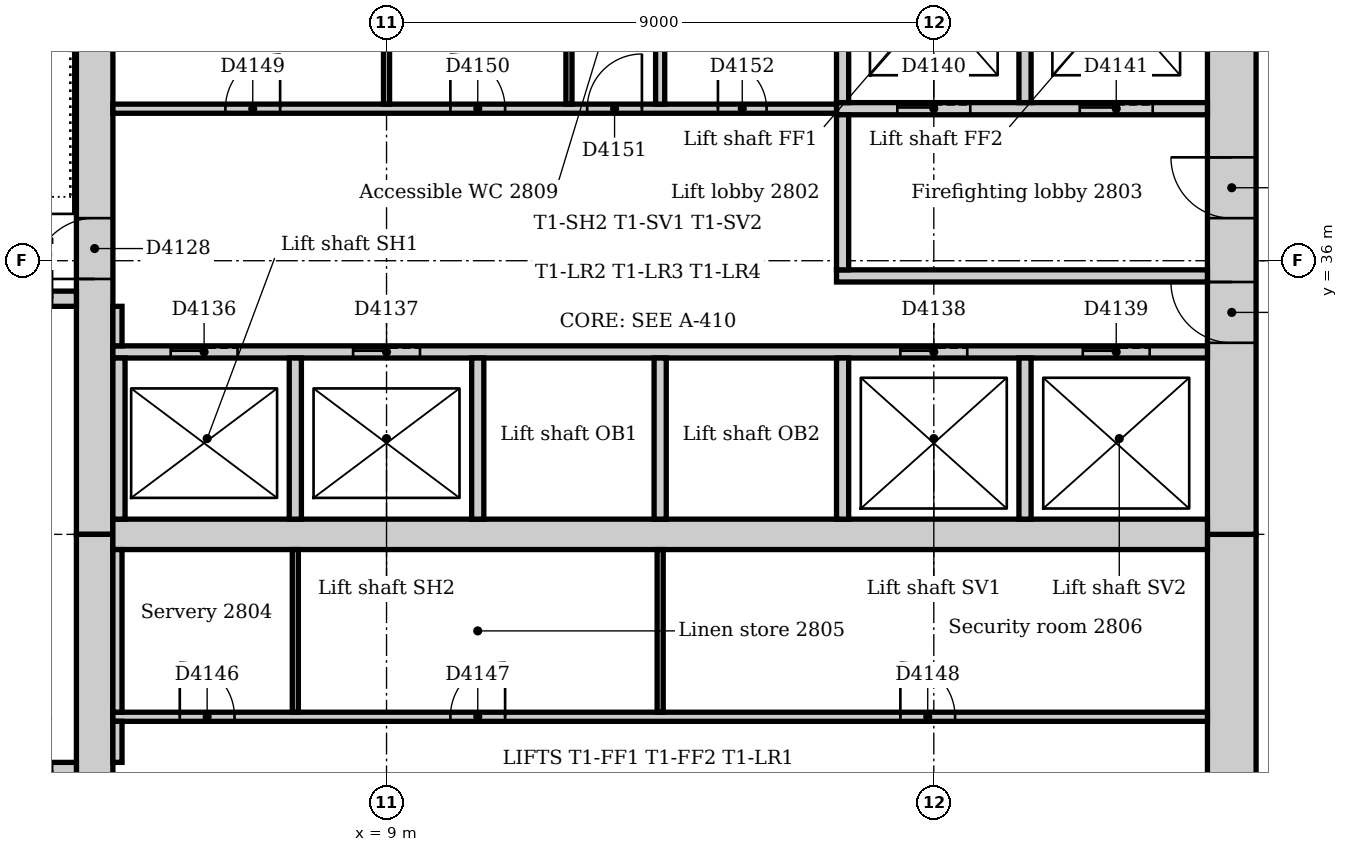
"""IFC4 building model, lengths in metres.
Left out: names, types, materials, properties, quantities, classifications, styles, units other than length and angle.
Written with IfcOpenShell. Run it as: python <this file> out.ifc"""

import sys

from ifc_helpers import new_model, si_unit, direction, frame, frame_2d, origin, place, context, subcontext, project, spatial, rectangle, extrude, element, fill, save


model = new_model("IFC4")
c1 = context("Model", 3, precision=1e-05, world=origin(), true_north=direction((0.0, 1.0)))
c2 = subcontext(c1, "Body", "Model", "MODEL_VIEW")
j1 = project(units=[si_unit("LENGTHUNIT", "METRE"), si_unit("PLANEANGLEUNIT", "RADIAN")], contexts=[c1])
p1 = place(None, origin())
s1 = spatial("IfcSite", under=j1, at=p1, CompositionType="ELEMENT")
p2 = place(p1, origin())
s2 = spatial("IfcBuilding", under=s1, at=p2, CompositionType="ELEMENT")
p3 = place(p2, frame((0.0, 0.0, 120.0)))
s3 = spatial("IfcBuildingStorey", under=s2, at=p3, CompositionType="ELEMENT", Elevation=120.0)
p4 = place(p3, frame((22.9, 21.0, 0.0), z_axis=(0.0, 0.0, 1.0), x_axis=(0.0, 1.0, 0.0)))
e1 = element("IfcWall", 1, at=p4, inside=s3, PredefinedType="SOLIDWALL", context=c2, shape_type="SweptSolid", body=[
    extrude(rectangle(XDim=10.5, YDim=0.8, at=frame_2d((5.25, 0.0))), origin(), (0.0, 0.0, 1.0), 4.0),
])
p5 = place(p4, frame((4.35, 0.0, 0.0)))
e2 = element("IfcOpeningElement", 2, at=p5, cuts=e1, PredefinedType="OPENING", context=c2, shape_type="SweptSolid", body=[
    extrude(rectangle(XDim=1.8, YDim=2.1, at=frame_2d((0.9, 1.05))), frame((0.0, 0.41, 0.0), z_axis=(0.0, -1.0, 0.0), x_axis=(1.0, 0.0, 0.0)), (0.0, 0.0, 1.0), 0.82),
])
p6 = place(p3, frame((22.9, 31.5, 0.0), z_axis=(0.0, 0.0, 1.0), x_axis=(0.0, 1.0, 0.0)))
e3 = element("IfcWall", 3, at=p6, inside=s3, PredefinedType="SOLIDWALL", context=c2, shape_type="SweptSolid", body=[
    extrude(rectangle(XDim=10.5, YDim=0.8, at=frame_2d((5.25, 0.0))), origin(), (0.0, 0.0, 1.0), 4.0),
])
p7 = place(p6, frame((3.15, 0.0, 0.0)))
e4 = element("IfcOpeningElement", 4, at=p7, cuts=e3, PredefinedType="OPENING", context=c2, shape_type="SweptSolid", body=[
    extrude(rectangle(XDim=1.0, YDim=2.1, at=frame_2d((0.5, 1.05))), frame((0.0, 0.41, 0.0), z_axis=(0.0, -1.0, 0.0), x_axis=(1.0, 0.0, 0.0)), (0.0, 0.0, 1.0), 0.82),
])
p8 = place(p6, frame((5.2, 0.0, 0.0)))
e5 = element("IfcOpeningElement", 5, at=p8, cuts=e3, PredefinedType="OPENING", context=c2, shape_type="SweptSolid", body=[
    extrude(rectangle(XDim=1.0, YDim=2.1, at=frame_2d((0.5, 1.05))), frame((0.0, 0.41, 0.0), z_axis=(0.0, -1.0, 0.0), x_axis=(1.0, 0.0, 0.0)), (0.0, 0.0, 1.0), 0.82),
])
p9 = place(p3, frame((4.2, 42.0, 0.0), z_axis=(0.0, 0.0, 1.0), x_axis=(0.0, -1.0, 0.0)))
e6 = element("IfcWall", 6, at=p9, inside=s3, PredefinedType="SOLIDWALL", context=c2, shape_type="SweptSolid", body=[
    extrude(rectangle(XDim=10.5, YDim=0.6, at=frame_2d((5.25, 0.0))), origin(), (0.0, 0.0, 1.0), 4.0),
])
p10 = place(p9, frame((5.3, 0.0, 0.0)))
e7 = element("IfcOpeningElement", 7, at=p10, cuts=e6, PredefinedType="OPENING", context=c2, shape_type="SweptSolid", body=[
    extrude(rectangle(XDim=1.0, YDim=2.1, at=frame_2d((0.5, 1.05))), frame((0.0, 0.31, 0.0), z_axis=(0.0, -1.0, 0.0), x_axis=(1.0, 0.0, 0.0)), (0.0, 0.0, 1.0), 0.62),
])
p11 = place(p3, frame((4.2, 31.5, 0.0), z_axis=(0.0, 0.0, 1.0), x_axis=(0.0, -1.0, 0.0)))
e8 = element("IfcWall", 8, at=p11, inside=s3, PredefinedType="SOLIDWALL", context=c2, shape_type="SweptSolid", body=[
    extrude(rectangle(XDim=10.5, YDim=0.6, at=frame_2d((5.25, 0.0))), origin(), (0.0, 0.0, 1.0), 4.0),
])
p12 = place(p11, frame((4.25, 0.0, 0.0)))
e9 = element("IfcOpeningElement", 9, at=p12, cuts=e8, PredefinedType="OPENING", context=c2, shape_type="SweptSolid", body=[
    extrude(rectangle(XDim=1.0, YDim=2.1, at=frame_2d((0.5, 1.05))), frame((0.0, 0.31, 0.0), z_axis=(0.0, -1.0, 0.0), x_axis=(1.0, 0.0, 0.0)), (0.0, 0.0, 1.0), 0.62),
])
p13 = place(p3, frame((4.5, 31.5, 0.0), z_axis=(0.0, 0.0, 1.0), x_axis=(1.0, 0.0, 0.0)))
e10 = element("IfcWall", 10, at=p13, inside=s3, PredefinedType="SOLIDWALL", context=c2, shape_type="SweptSolid", body=[
    extrude(rectangle(XDim=18.0, YDim=0.5, at=frame_2d((9.0, 0.0))), origin(), (0.0, 0.0, 1.0), 4.0),
])
p14 = place(p3, frame((3.9, 27.625, 0.0), z_axis=(0.0, 0.0, 1.0), x_axis=(-1.0, 0.0, 0.0)))
e11 = element("IfcWall", 11, at=p14, inside=s3, PredefinedType="SOLIDWALL", context=c2, shape_type="SweptSolid", body=[
    extrude(rectangle(XDim=3.54, YDim=0.25, at=frame_2d((1.77, 0.0))), origin(), (0.0, 0.0, 1.0), 4.0),
])
p15 = place(p14, frame((0.4, 0.0, 0.0)))
e12 = element("IfcOpeningElement", 12, at=p15, cuts=e11, PredefinedType="OPENING", context=c2, shape_type="SweptSolid", body=[
    extrude(rectangle(XDim=1.0, YDim=2.1, at=frame_2d((0.5, 1.05))), frame((0.0, 0.135, 0.0), z_axis=(0.0, -1.0, 0.0), x_axis=(1.0, 0.0, 0.0)), (0.0, 0.0, 1.0), 0.27),
])
p16 = place(p3, frame((0.36, 35.375, 0.0), z_axis=(0.0, 0.0, 1.0), x_axis=(1.0, 0.0, 0.0)))
e13 = element("IfcWall", 13, at=p16, inside=s3, PredefinedType="SOLIDWALL", context=c2, shape_type="SweptSolid", body=[
    extrude(rectangle(XDim=3.54, YDim=0.25, at=frame_2d((1.77, 0.0))), origin(), (0.0, 0.0, 1.0), 4.0),
])
p17 = place(p16, frame((2.14, 0.0, 0.0)))
e14 = element("IfcOpeningElement", 14, at=p17, cuts=e13, PredefinedType="OPENING", context=c2, shape_type="SweptSolid", body=[
    extrude(rectangle(XDim=1.0, YDim=2.1, at=frame_2d((0.5, 1.05))), frame((0.0, 0.135, 0.0), z_axis=(0.0, -1.0, 0.0), x_axis=(1.0, 0.0, 0.0)), (0.0, 0.0, 1.0), 0.27),
])
p18 = place(p3, frame((16.4, 35.75, 0.0), z_axis=(0.0, 0.0, 1.0), x_axis=(1.0, 0.0, 0.0)))
e15 = element("IfcWall", 15, at=p18, inside=s3, PredefinedType="PARTITIONING", context=c2, shape_type="SweptSolid", body=[
    extrude(rectangle(XDim=6.1, YDim=0.2, at=frame_2d((3.05, 0.0))), origin(), (0.0, 0.0, 1.0), 3.85),
])
p19 = place(p3, frame((16.4, 38.5, 0.0), z_axis=(0.0, 0.0, 1.0), x_axis=(1.0, 0.0, 0.0)))
e16 = element("IfcWall", 16, at=p19, inside=s3, PredefinedType="PARTITIONING", context=c2, shape_type="SweptSolid", body=[
    extrude(rectangle(XDim=6.1, YDim=0.2, at=frame_2d((3.05, 0.0))), origin(), (0.0, 0.0, 1.0), 3.85),
])
p20 = place(p19, frame((1.0, 0.0, 0.0)))
e17 = element("IfcOpeningElement", 17, at=p20, cuts=e16, PredefinedType="OPENING", context=c2, shape_type="SweptSolid", body=[
    extrude(rectangle(XDim=1.2, YDim=2.1, at=frame_2d((0.6, 1.05))), frame((0.0, 0.11, 0.0), z_axis=(0.0, -1.0, 0.0), x_axis=(1.0, 0.0, 0.0)), (0.0, 0.0, 1.0), 0.22),
])
p21 = place(p19, frame((4.0, 0.0, 0.0)))
e18 = element("IfcOpeningElement", 18, at=p21, cuts=e16, PredefinedType="OPENING", context=c2, shape_type="SweptSolid", body=[
    extrude(rectangle(XDim=1.2, YDim=2.1, at=frame_2d((0.6, 1.05))), frame((0.0, 0.11, 0.0), z_axis=(0.0, -1.0, 0.0), x_axis=(1.0, 0.0, 0.0)), (0.0, 0.0, 1.0), 0.22),
])
p22 = place(p3, frame((16.5, 35.85, 0.0), z_axis=(0.0, 0.0, 1.0), x_axis=(0.0, 1.0, 0.0)))
e19 = element("IfcWall", 19, at=p22, inside=s3, PredefinedType="PARTITIONING", context=c2, shape_type="SweptSolid", body=[
    extrude(rectangle(XDim=2.55, YDim=0.2, at=frame_2d((1.275, 0.0))), origin(), (0.0, 0.0, 1.0), 3.85),
])
p23 = place(p3, frame((4.5, 34.5, 0.0), z_axis=(0.0, 0.0, 1.0), x_axis=(1.0, 0.0, 0.0)))
e20 = element("IfcWall", 20, at=p23, inside=s3, PredefinedType="PARTITIONING", context=c2, shape_type="SweptSolid", body=[
    extrude(rectangle(XDim=18.0, YDim=0.2, at=frame_2d((9.0, 0.0))), origin(), (0.0, 0.0, 1.0), 3.85),
])
p24 = place(p23, frame((0.95, 0.0, 0.0)))
e21 = element("IfcOpeningElement", 21, at=p24, cuts=e20, PredefinedType="OPENING", context=c2, shape_type="SweptSolid", body=[
    extrude(rectangle(XDim=1.1, YDim=2.1, at=frame_2d((0.55, 1.05))), frame((0.0, 0.11, 0.0), z_axis=(0.0, -1.0, 0.0), x_axis=(1.0, 0.0, 0.0)), (0.0, 0.0, 1.0), 0.22),
])
p25 = place(p23, frame((3.95, 0.0, 0.0)))
e22 = element("IfcOpeningElement", 22, at=p25, cuts=e20, PredefinedType="OPENING", context=c2, shape_type="SweptSolid", body=[
    extrude(rectangle(XDim=1.1, YDim=2.1, at=frame_2d((0.55, 1.05))), frame((0.0, 0.11, 0.0), z_axis=(0.0, -1.0, 0.0), x_axis=(1.0, 0.0, 0.0)), (0.0, 0.0, 1.0), 0.22),
])
p26 = place(p23, frame((12.95, 0.0, 0.0)))
e23 = element("IfcOpeningElement", 23, at=p26, cuts=e20, PredefinedType="OPENING", context=c2, shape_type="SweptSolid", body=[
    extrude(rectangle(XDim=1.1, YDim=2.1, at=frame_2d((0.55, 1.05))), frame((0.0, 0.11, 0.0), z_axis=(0.0, -1.0, 0.0), x_axis=(1.0, 0.0, 0.0)), (0.0, 0.0, 1.0), 0.22),
])
p27 = place(p23, frame((15.95, 0.0, 0.0)))
e24 = element("IfcOpeningElement", 24, at=p27, cuts=e20, PredefinedType="OPENING", context=c2, shape_type="SweptSolid", body=[
    extrude(rectangle(XDim=1.1, YDim=2.1, at=frame_2d((0.55, 1.05))), frame((0.0, 0.11, 0.0), z_axis=(0.0, -1.0, 0.0), x_axis=(1.0, 0.0, 0.0)), (0.0, 0.0, 1.0), 0.22),
])
for number, where, z_axis, x_axis in (
    (25, (16.5, 38.6, 0.0), (0.0, 0.0, 1.0), (0.0, 1.0, 0.0)),
    (26, (19.5, 38.6, 0.0), (0.0, 0.0, 1.0), (0.0, 1.0, 0.0)),
):
    element("IfcWall", number, at=place(p3, frame(where, z_axis=z_axis, x_axis=x_axis)), inside=s3, PredefinedType="PARTITIONING", context=c2, shape_type="SweptSolid", body=[
        extrude(rectangle(XDim=3.4, YDim=0.2, at=frame_2d((1.7, 0.0))), origin(), (0.0, 0.0, 1.0), 3.85),
    ])
for number, where, z_axis, x_axis in (
    (27, (4.6, 31.75, 0.0), (0.0, 0.0, 1.0), (0.0, 1.0, 0.0)),
    (28, (7.5, 31.75, 0.0), (0.0, 0.0, 1.0), (0.0, 1.0, 0.0)),
    (29, (10.5, 31.75, 0.0), (0.0, 0.0, 1.0), (0.0, 1.0, 0.0)),
    (30, (13.5, 31.75, 0.0), (0.0, 0.0, 1.0), (0.0, 1.0, 0.0)),
    (31, (16.5, 31.75, 0.0), (0.0, 0.0, 1.0), (0.0, 1.0, 0.0)),
    (32, (19.5, 31.75, 0.0), (0.0, 0.0, 1.0), (0.0, 1.0, 0.0)),
):
    element("IfcWall", number, at=place(p3, frame(where, z_axis=z_axis, x_axis=x_axis)), inside=s3, PredefinedType="PARTITIONING", context=c2, shape_type="SweptSolid", body=[
        extrude(rectangle(XDim=2.65, YDim=0.2, at=frame_2d((1.325, 0.0))), origin(), (0.0, 0.0, 1.0), 3.85),
    ])
p28 = place(p3, frame((4.5, 28.5, 0.0), z_axis=(0.0, 0.0, 1.0), x_axis=(1.0, 0.0, 0.0)))
e33 = element("IfcWall", 33, at=p28, inside=s3, PredefinedType="PARTITIONING", context=c2, shape_type="SweptSolid", body=[
    extrude(rectangle(XDim=18.0, YDim=0.15, at=frame_2d((9.0, 0.0))), origin(), (0.0, 0.0, 1.0), 3.85),
])
p29 = place(p28, frame((1.1, 0.0, 0.0)))
e34 = element("IfcOpeningElement", 34, at=p29, cuts=e33, PredefinedType="OPENING", context=c2, shape_type="SweptSolid", body=[
    extrude(rectangle(XDim=0.9, YDim=2.1, at=frame_2d((0.45, 1.05))), frame((0.0, 0.085, 0.0), z_axis=(0.0, -1.0, 0.0), x_axis=(1.0, 0.0, 0.0)), (0.0, 0.0, 1.0), 0.17),
])
p30 = place(p28, frame((5.55, 0.0, 0.0)))
e35 = element("IfcOpeningElement", 35, at=p30, cuts=e33, PredefinedType="OPENING", context=c2, shape_type="SweptSolid", body=[
    extrude(rectangle(XDim=0.9, YDim=2.1, at=frame_2d((0.45, 1.05))), frame((0.0, 0.085, 0.0), z_axis=(0.0, -1.0, 0.0), x_axis=(1.0, 0.0, 0.0)), (0.0, 0.0, 1.0), 0.17),
])
p31 = place(p28, frame((12.95, 0.0, 0.0)))
e36 = element("IfcOpeningElement", 36, at=p31, cuts=e33, PredefinedType="OPENING", context=c2, shape_type="SweptSolid", body=[
    extrude(rectangle(XDim=0.9, YDim=2.1, at=frame_2d((0.45, 1.05))), frame((0.0, 0.085, 0.0), z_axis=(0.0, -1.0, 0.0), x_axis=(1.0, 0.0, 0.0)), (0.0, 0.0, 1.0), 0.17),
])
p32 = place(p3, frame((4.5, 38.5, 0.0), z_axis=(0.0, 0.0, 1.0), x_axis=(1.0, 0.0, 0.0)))
e37 = element("IfcWall", 37, at=p32, inside=s3, PredefinedType="PARTITIONING", context=c2, shape_type="SweptSolid", body=[
    extrude(rectangle(XDim=11.9, YDim=0.15, at=frame_2d((5.95, 0.0))), origin(), (0.0, 0.0, 1.0), 3.85),
])
p33 = place(p32, frame((1.85, 0.0, 0.0)))
e38 = element("IfcOpeningElement", 38, at=p33, cuts=e37, PredefinedType="OPENING", context=c2, shape_type="SweptSolid", body=[
    extrude(rectangle(XDim=0.9, YDim=2.1, at=frame_2d((0.45, 1.05))), frame((0.0, 0.085, 0.0), z_axis=(0.0, -1.0, 0.0), x_axis=(1.0, 0.0, 0.0)), (0.0, 0.0, 1.0), 0.17),
])
p34 = place(p32, frame((5.55, 0.0, 0.0)))
e39 = element("IfcOpeningElement", 39, at=p34, cuts=e37, PredefinedType="OPENING", context=c2, shape_type="SweptSolid", body=[
    extrude(rectangle(XDim=0.9, YDim=2.1, at=frame_2d((0.45, 1.05))), frame((0.0, 0.085, 0.0), z_axis=(0.0, -1.0, 0.0), x_axis=(1.0, 0.0, 0.0)), (0.0, 0.0, 1.0), 0.17),
])
p35 = place(p32, frame((7.8, 0.0, 0.0)))
e40 = element("IfcOpeningElement", 40, at=p35, cuts=e37, PredefinedType="OPENING", context=c2, shape_type="SweptSolid", body=[
    extrude(rectangle(XDim=0.9, YDim=2.1, at=frame_2d((0.45, 1.05))), frame((0.0, 0.085, 0.0), z_axis=(0.0, -1.0, 0.0), x_axis=(1.0, 0.0, 0.0)), (0.0, 0.0, 1.0), 0.17),
])
p36 = place(p32, frame((9.95, 0.0, 0.0)))
e41 = element("IfcOpeningElement", 41, at=p36, cuts=e37, PredefinedType="OPENING", context=c2, shape_type="SweptSolid", body=[
    extrude(rectangle(XDim=0.8, YDim=2.1, at=frame_2d((0.4, 1.05))), frame((0.0, 0.085, 0.0), z_axis=(0.0, -1.0, 0.0), x_axis=(1.0, 0.0, 0.0)), (0.0, 0.0, 1.0), 0.17),
])
p37 = place(p3, frame((4.575, 27.75, 0.0), z_axis=(0.0, 0.0, 1.0), x_axis=(0.0, 1.0, 0.0)))
e42 = element("IfcWall", 42, at=p37, inside=s3, PredefinedType="PARTITIONING", context=c2, shape_type="SweptSolid", body=[
    extrude(rectangle(XDim=0.675, YDim=0.15, at=frame_2d((0.338, 0.0))), origin(), (0.0, 0.0, 1.0), 3.85),
])
p38 = place(p3, frame((4.575, 28.575, 0.0), z_axis=(0.0, 0.0, 1.0), x_axis=(0.0, 1.0, 0.0)))
e43 = element("IfcWall", 43, at=p38, inside=s3, PredefinedType="PARTITIONING", context=c2, shape_type="SweptSolid", body=[
    extrude(rectangle(XDim=2.675, YDim=0.15, at=frame_2d((1.337, 0.0))), origin(), (0.0, 0.0, 1.0), 3.85),
])
p39 = place(p3, frame((4.575, 34.6, 0.0), z_axis=(0.0, 0.0, 1.0), x_axis=(0.0, 1.0, 0.0)))
e44 = element("IfcWall", 44, at=p39, inside=s3, PredefinedType="PARTITIONING", context=c2, shape_type="SweptSolid", body=[
    extrude(rectangle(XDim=0.65, YDim=0.15, at=frame_2d((0.325, 0.0))), origin(), (0.0, 0.0, 1.0), 3.85),
])
p40 = place(p3, frame((13.5, 38.575, 0.0), z_axis=(0.0, 0.0, 1.0), x_axis=(0.0, 1.0, 0.0)))
e45 = element("IfcWall", 45, at=p40, inside=s3, PredefinedType="PARTITIONING", context=c2, shape_type="SweptSolid", body=[
    extrude(rectangle(XDim=3.425, YDim=0.15, at=frame_2d((1.712, 0.0))), origin(), (0.0, 0.0, 1.0), 3.85),
])
for number, where, z_axis, x_axis in (
    (46, (9.0, 38.575, 0.0), (0.0, 0.0, 1.0), (0.0, 1.0, 0.0)),
    (47, (12.0, 38.575, 0.0), (0.0, 0.0, 1.0), (0.0, 1.0, 0.0)),
):
    element("IfcWall", number, at=place(p3, frame(where, z_axis=z_axis, x_axis=x_axis)), inside=s3, PredefinedType="PARTITIONING", context=c2, shape_type="SweptSolid", body=[
        extrude(rectangle(XDim=3.425, YDim=0.1, at=frame_2d((1.712, 0.0))), origin(), (0.0, 0.0, 1.0), 3.85),
    ])
for number, where, z_axis, x_axis in (
    (48, (7.5, 28.575, 0.0), (0.0, 0.0, 1.0), (0.0, 1.0, 0.0)),
    (49, (13.5, 28.575, 0.0), (0.0, 0.0, 1.0), (0.0, 1.0, 0.0)),
):
    element("IfcWall", number, at=place(p3, frame(where, z_axis=z_axis, x_axis=x_axis)), inside=s3, PredefinedType="PARTITIONING", context=c2, shape_type="SweptSolid", body=[
        extrude(rectangle(XDim=2.675, YDim=0.1, at=frame_2d((1.337, 0.0))), origin(), (0.0, 0.0, 1.0), 3.85),
    ])
p41 = place(p10, frame((1.0, 0.0, 0.0), z_axis=(0.0, 0.0, 1.0), x_axis=(-1.0, 0.0, 0.0)))
e50 = element("IfcDoor", 50, at=p41, inside=s3, OperationType="SINGLE_SWING_LEFT", PredefinedType="DOOR", context=c2, shape_type="SweptSolid", body=[
    extrude(rectangle(XDim=1.0, YDim=2.1, at=frame_2d((0.5, 1.05))), frame((0.0, 0.025, 0.0), z_axis=(0.0, -1.0, 0.0), x_axis=(1.0, 0.0, 0.0)), (0.0, 0.0, 1.0), 0.05),
])
fill(e7, e50)
p42 = place(p24, origin())
e51 = element("IfcDoor", 51, at=p42, inside=s3, OperationType="SLIDING_TO_LEFT", PredefinedType="DOOR", context=c2, shape_type="SweptSolid", body=[
    extrude(rectangle(XDim=1.1, YDim=2.1, at=frame_2d((0.55, 1.05))), frame((0.0, 0.025, 0.0), z_axis=(0.0, -1.0, 0.0), x_axis=(1.0, 0.0, 0.0)), (0.0, 0.0, 1.0), 0.05),
])
fill(e21, e51)
p43 = place(p25, origin())
e52 = element("IfcDoor", 52, at=p43, inside=s3, OperationType="SLIDING_TO_LEFT", PredefinedType="DOOR", context=c2, shape_type="SweptSolid", body=[
    extrude(rectangle(XDim=1.1, YDim=2.1, at=frame_2d((0.55, 1.05))), frame((0.0, 0.025, 0.0), z_axis=(0.0, -1.0, 0.0), x_axis=(1.0, 0.0, 0.0)), (0.0, 0.0, 1.0), 0.05),
])
fill(e22, e52)
p44 = place(p26, origin())
e53 = element("IfcDoor", 53, at=p44, inside=s3, OperationType="SLIDING_TO_LEFT", PredefinedType="DOOR", context=c2, shape_type="SweptSolid", body=[
    extrude(rectangle(XDim=1.1, YDim=2.1, at=frame_2d((0.55, 1.05))), frame((0.0, 0.025, 0.0), z_axis=(0.0, -1.0, 0.0), x_axis=(1.0, 0.0, 0.0)), (0.0, 0.0, 1.0), 0.05),
])
fill(e23, e53)
p45 = place(p27, origin())
e54 = element("IfcDoor", 54, at=p45, inside=s3, OperationType="SLIDING_TO_LEFT", PredefinedType="DOOR", context=c2, shape_type="SweptSolid", body=[
    extrude(rectangle(XDim=1.1, YDim=2.1, at=frame_2d((0.55, 1.05))), frame((0.0, 0.025, 0.0), z_axis=(0.0, -1.0, 0.0), x_axis=(1.0, 0.0, 0.0)), (0.0, 0.0, 1.0), 0.05),
])
fill(e24, e54)
p46 = place(p20, origin())
e55 = element("IfcDoor", 55, at=p46, inside=s3, OperationType="SLIDING_TO_LEFT", PredefinedType="DOOR", context=c2, shape_type="SweptSolid", body=[
    extrude(rectangle(XDim=1.2, YDim=2.1, at=frame_2d((0.6, 1.05))), frame((0.0, 0.025, 0.0), z_axis=(0.0, -1.0, 0.0), x_axis=(1.0, 0.0, 0.0)), (0.0, 0.0, 1.0), 0.05),
])
fill(e17, e55)
p47 = place(p21, origin())
e56 = element("IfcDoor", 56, at=p47, inside=s3, OperationType="SLIDING_TO_LEFT", PredefinedType="DOOR", context=c2, shape_type="SweptSolid", body=[
    extrude(rectangle(XDim=1.2, YDim=2.1, at=frame_2d((0.6, 1.05))), frame((0.0, 0.025, 0.0), z_axis=(0.0, -1.0, 0.0), x_axis=(1.0, 0.0, 0.0)), (0.0, 0.0, 1.0), 0.05),
])
fill(e18, e56)
p48 = place(p7, origin())
e57 = element("IfcDoor", 57, at=p48, inside=s3, OperationType="SINGLE_SWING_RIGHT", PredefinedType="DOOR", context=c2, shape_type="SweptSolid", body=[
    extrude(rectangle(XDim=1.0, YDim=2.1, at=frame_2d((0.5, 1.05))), frame((0.0, 0.025, 0.0), z_axis=(0.0, -1.0, 0.0), x_axis=(1.0, 0.0, 0.0)), (0.0, 0.0, 1.0), 0.05),
])
fill(e4, e57)
p49 = place(p8, origin())
e58 = element("IfcDoor", 58, at=p49, inside=s3, OperationType="SINGLE_SWING_RIGHT", PredefinedType="DOOR", context=c2, shape_type="SweptSolid", body=[
    extrude(rectangle(XDim=1.0, YDim=2.1, at=frame_2d((0.5, 1.05))), frame((0.0, 0.025, 0.0), z_axis=(0.0, -1.0, 0.0), x_axis=(1.0, 0.0, 0.0)), (0.0, 0.0, 1.0), 0.05),
])
fill(e5, e58)
p50 = place(p29, origin())
e59 = element("IfcDoor", 59, at=p50, inside=s3, OperationType="SINGLE_SWING_LEFT", PredefinedType="DOOR", context=c2, shape_type="SweptSolid", body=[
    extrude(rectangle(XDim=0.9, YDim=2.1, at=frame_2d((0.45, 1.05))), frame((0.0, 0.025, 0.0), z_axis=(0.0, -1.0, 0.0), x_axis=(1.0, 0.0, 0.0)), (0.0, 0.0, 1.0), 0.05),
])
fill(e34, e59)
p51 = place(p30, origin())
e60 = element("IfcDoor", 60, at=p51, inside=s3, OperationType="SINGLE_SWING_RIGHT", PredefinedType="DOOR", context=c2, shape_type="SweptSolid", body=[
    extrude(rectangle(XDim=0.9, YDim=2.1, at=frame_2d((0.45, 1.05))), frame((0.0, 0.025, 0.0), z_axis=(0.0, -1.0, 0.0), x_axis=(1.0, 0.0, 0.0)), (0.0, 0.0, 1.0), 0.05),
])
fill(e35, e60)
p52 = place(p31, origin())
e61 = element("IfcDoor", 61, at=p52, inside=s3, OperationType="SINGLE_SWING_LEFT", PredefinedType="DOOR", context=c2, shape_type="SweptSolid", body=[
    extrude(rectangle(XDim=0.9, YDim=2.1, at=frame_2d((0.45, 1.05))), frame((0.0, 0.025, 0.0), z_axis=(0.0, -1.0, 0.0), x_axis=(1.0, 0.0, 0.0)), (0.0, 0.0, 1.0), 0.05),
])
fill(e36, e61)
p53 = place(p33, origin())
e62 = element("IfcDoor", 62, at=p53, inside=s3, OperationType="SINGLE_SWING_RIGHT", PredefinedType="DOOR", context=c2, shape_type="SweptSolid", body=[
    extrude(rectangle(XDim=0.9, YDim=2.1, at=frame_2d((0.45, 1.05))), frame((0.0, 0.025, 0.0), z_axis=(0.0, -1.0, 0.0), x_axis=(1.0, 0.0, 0.0)), (0.0, 0.0, 1.0), 0.05),
])
fill(e38, e62)
p54 = place(p34, origin())
e63 = element("IfcDoor", 63, at=p54, inside=s3, OperationType="SINGLE_SWING_LEFT", PredefinedType="DOOR", context=c2, shape_type="SweptSolid", body=[
    extrude(rectangle(XDim=0.9, YDim=2.1, at=frame_2d((0.45, 1.05))), frame((0.0, 0.025, 0.0), z_axis=(0.0, -1.0, 0.0), x_axis=(1.0, 0.0, 0.0)), (0.0, 0.0, 1.0), 0.05),
])
fill(e39, e63)
p55 = place(p35, origin())
e64 = element("IfcDoor", 64, at=p55, inside=s3, OperationType="SINGLE_SWING_RIGHT", PredefinedType="DOOR", context=c2, shape_type="SweptSolid", body=[
    extrude(rectangle(XDim=0.9, YDim=2.1, at=frame_2d((0.45, 1.05))), frame((0.0, 0.025, 0.0), z_axis=(0.0, -1.0, 0.0), x_axis=(1.0, 0.0, 0.0)), (0.0, 0.0, 1.0), 0.05),
])
fill(e40, e64)
p56 = place(p36, origin())
e65 = element("IfcDoor", 65, at=p56, inside=s3, OperationType="SINGLE_SWING_LEFT", PredefinedType="DOOR", context=c2, shape_type="SweptSolid", body=[
    extrude(rectangle(XDim=0.8, YDim=2.1, at=frame_2d((0.4, 1.05))), frame((0.0, 0.025, 0.0), z_axis=(0.0, -1.0, 0.0), x_axis=(1.0, 0.0, 0.0)), (0.0, 0.0, 1.0), 0.05),
])
fill(e41, e65)
save(model, sys.argv[1])
